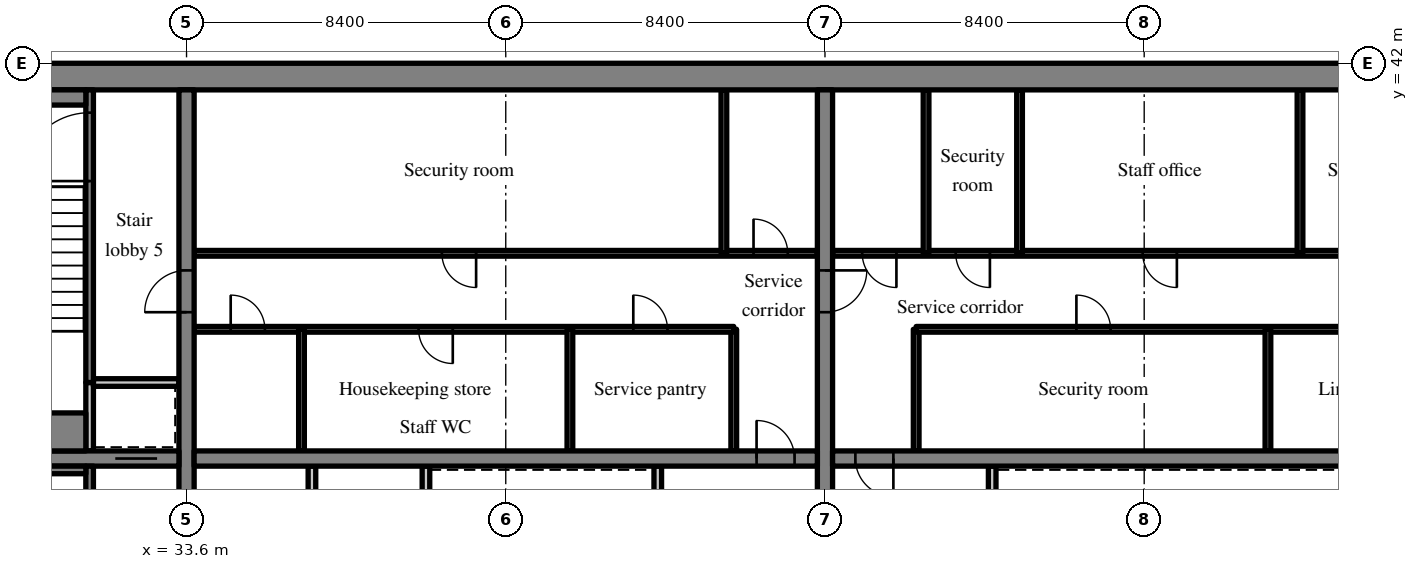
"""IFC4 building model, lengths in metres.
Left out: names, types, materials, properties, quantities, classifications, styles, units other than length and angle.
Written with IfcOpenShell. Run it as: python <this file> out.ifc"""

import sys

from ifc_helpers import new_model, si_unit, direction, frame, frame_2d, origin, place, context, subcontext, project, spatial, rectangle, extrude, source, transform, mapped, element, fill, save


model = new_model("IFC4")
c1 = context("Model", 3, precision=1e-05, world=origin(), true_north=direction((0.0, 1.0)))
c2 = subcontext(c1, "Body", "Model", "MODEL_VIEW")
j1 = project(units=[si_unit("LENGTHUNIT", "METRE"), si_unit("PLANEANGLEUNIT", "RADIAN")], contexts=[c1])
p1 = place(None, origin())
s1 = spatial("IfcSite", under=j1, at=p1, CompositionType="ELEMENT")
p2 = place(p1, origin())
s2 = spatial("IfcBuilding", under=s1, at=p2, CompositionType="ELEMENT")
p3 = place(p2, frame((0.0, 0.0, 189.6)))
s3 = spatial("IfcBuildingStorey", under=s2, at=p3, CompositionType="ELEMENT", Elevation=189.6)
m1 = source(origin(), c2, "Body", "SweptSolid", [
    extrude(rectangle(XDim=50.4, YDim=0.7, at=frame_2d((25.2, 0.0))), origin(), (0.0, 0.0, 1.0), 3.52),
])
p4 = place(p3, frame((25.2, 41.65, 0.0), z_axis=(0.0, 0.0, 1.0), x_axis=(1.0, 0.0, 0.0)))
e1 = element("IfcWall", 1, at=p4, inside=s3, PredefinedType="SHEAR", context=c2, shape_type="MappedRepresentation", body=[
    mapped(m1, transform((0.0, 0.0, 0.0), scale=1.0)),
])
m2 = source(origin(), c2, "Body", "SweptSolid", [
    extrude(rectangle(XDim=18.6, YDim=0.4, at=frame_2d((9.3, 0.0))), origin(), (0.0, 0.0, 1.0), 3.52),
])
p5 = place(p3, frame((33.6, 22.7, 0.0), z_axis=(0.0, 0.0, 1.0), x_axis=(0.0, 1.0, 0.0)))
e2 = element("IfcWall", 2, at=p5, inside=s3, PredefinedType="SHEAR", context=c2, shape_type="MappedRepresentation", body=[
    mapped(m2, transform((0.0, 0.0, 0.0), scale=1.0)),
])
m3 = source(origin(), c2, "Body", "SweptSolid", [
    extrude(rectangle(XDim=1.1, YDim=2.1, at=frame_2d((0.55, 1.05))), frame((0.0, 0.21, 0.0), z_axis=(0.0, -1.0, 0.0), x_axis=(1.0, 0.0, 0.0)), (0.0, 0.0, 1.0), 0.42),
])
p6 = place(p5, frame((12.75, 0.0, 0.0)))
e3 = element("IfcOpeningElement", 3, at=p6, cuts=e2, PredefinedType="OPENING", context=c2, shape_type="MappedRepresentation", body=[
    mapped(m3, transform((0.0, 0.0, 0.0), scale=1.0)),
])
p7 = place(p3, frame((50.4, 22.7, 0.0), z_axis=(0.0, 0.0, 1.0), x_axis=(0.0, 1.0, 0.0)))
e4 = element("IfcWall", 4, at=p7, inside=s3, PredefinedType="SHEAR", context=c2, shape_type="MappedRepresentation", body=[
    mapped(m2, transform((0.0, 0.0, 0.0), scale=1.0)),
])
p8 = place(p7, frame((12.75, 0.0, 0.0)))
e5 = element("IfcOpeningElement", 5, at=p8, cuts=e4, PredefinedType="OPENING", context=c2, shape_type="MappedRepresentation", body=[
    mapped(m3, transform((0.0, 0.0, 0.0), scale=1.0)),
])
m4 = source(origin(), c2, "Body", "SweptSolid", [
    extrude(rectangle(XDim=7.5, YDim=0.4, at=frame_2d((3.75, 0.0))), origin(), (0.0, 0.0, 1.0), 3.52),
])
p9 = place(p3, frame((25.9, 31.6, 0.0), z_axis=(0.0, 0.0, 1.0), x_axis=(1.0, 0.0, 0.0)))
e6 = element("IfcWall", 6, at=p9, inside=s3, PredefinedType="SHEAR", context=c2, shape_type="MappedRepresentation", body=[
    mapped(m4, transform((0.0, 0.0, 0.0), scale=1.0)),
])
p10 = place(p9, frame((5.825, 0.0, 0.0)))
e7 = element("IfcOpeningElement", 7, at=p10, cuts=e6, PredefinedType="OPENING", context=c2, shape_type="MappedRepresentation", body=[
    mapped(m3, transform((0.0, 0.0, 0.0), scale=1.0)),
])
m5 = source(origin(), c2, "Body", "SweptSolid", [
    extrude(rectangle(XDim=16.4, YDim=0.4, at=frame_2d((8.2, 0.0))), origin(), (0.0, 0.0, 1.0), 3.52),
])
p11 = place(p3, frame((33.8, 31.6, 0.0), z_axis=(0.0, 0.0, 1.0), x_axis=(1.0, 0.0, 0.0)))
e8 = element("IfcWall", 8, at=p11, inside=s3, PredefinedType="SHEAR", context=c2, shape_type="MappedRepresentation", body=[
    mapped(m5, transform((0.0, 0.0, 0.0), scale=1.0)),
])
m6 = source(origin(), c2, "Body", "SweptSolid", [
    extrude(rectangle(XDim=1.0, YDim=2.1, at=frame_2d((0.5, 1.05))), frame((0.0, 0.21, 0.0), z_axis=(0.0, -1.0, 0.0), x_axis=(1.0, 0.0, 0.0)), (0.0, 0.0, 1.0), 0.42),
])
p12 = place(p11, frame((14.8, 0.0, 0.0)))
e9 = element("IfcOpeningElement", 9, at=p12, cuts=e8, PredefinedType="OPENING", context=c2, shape_type="MappedRepresentation", body=[
    mapped(m6, transform((0.0, 0.0, 0.0), scale=1.0)),
])
p13 = place(p3, frame((50.6, 31.6, 0.0), z_axis=(0.0, 0.0, 1.0), x_axis=(1.0, 0.0, 0.0)))
e10 = element("IfcWall", 10, at=p13, inside=s3, PredefinedType="SHEAR", context=c2, shape_type="MappedRepresentation", body=[
    mapped(m5, transform((0.0, 0.0, 0.0), scale=1.0)),
])
p14 = place(p13, frame((0.6, 0.0, 0.0)))
e11 = element("IfcOpeningElement", 11, at=p14, cuts=e10, PredefinedType="OPENING", context=c2, shape_type="MappedRepresentation", body=[
    mapped(m6, transform((0.0, 0.0, 0.0), scale=1.0)),
])
m7 = source(origin(), c2, "Body", "SweptSolid", [
    extrude(rectangle(XDim=8.7, YDim=0.2, at=frame_2d((4.35, 0.0))), origin(), (0.0, 0.0, 1.0), 3.52),
])
p15 = place(p3, frame((39.9, 22.7, 0.0), z_axis=(0.0, 0.0, 1.0), x_axis=(0.0, 1.0, 0.0)))
e12 = element("IfcWall", 12, at=p15, inside=s3, PredefinedType="PARTITIONING", context=c2, shape_type="MappedRepresentation", body=[
    mapped(m7, transform((0.0, 0.0, 0.0), scale=1.0)),
])
m8 = source(origin(), c2, "Body", "SweptSolid", [
    extrude(rectangle(XDim=0.9, YDim=2.1, at=frame_2d((0.45, 1.05))), frame((0.0, 0.11, 0.0), z_axis=(0.0, -1.0, 0.0), x_axis=(1.0, 0.0, 0.0)), (0.0, 0.0, 1.0), 0.22),
])
p16 = place(p15, frame((3.05, 0.0, 0.0)))
e13 = element("IfcOpeningElement", 13, at=p16, cuts=e12, PredefinedType="OPENING", context=c2, shape_type="MappedRepresentation", body=[
    mapped(m8, transform((0.0, 0.0, 0.0), scale=1.0)),
])
p17 = place(p15, frame((4.85, 0.0, 0.0)))
e14 = element("IfcOpeningElement", 14, at=p17, cuts=e12, PredefinedType="OPENING", context=c2, shape_type="MappedRepresentation", body=[
    mapped(m8, transform((0.0, 0.0, 0.0), scale=1.0)),
])
m9 = source(origin(), c2, "Body", "SweptSolid", [
    extrude(rectangle(XDim=2.6, YDim=0.2, at=frame_2d((1.3, 0.0))), origin(), (0.0, 0.0, 1.0), 3.52),
])
p18 = place(p3, frame((46.0, 28.8, 0.0), z_axis=(0.0, 0.0, 1.0), x_axis=(0.0, 1.0, 0.0)))
e15 = element("IfcWall", 15, at=p18, inside=s3, PredefinedType="SOLIDWALL", context=c2, shape_type="MappedRepresentation", body=[
    mapped(m9, transform((0.0, 0.0, 0.0), scale=1.0)),
])
p19 = place(p3, frame((36.9, 22.7, 0.0), z_axis=(0.0, 0.0, 1.0), x_axis=(0.0, 1.0, 0.0)))
e16 = element("IfcWall", 16, at=p19, inside=s3, PredefinedType="PARTITIONING", context=c2, shape_type="MappedRepresentation", body=[
    mapped(m7, transform((0.0, 0.0, 0.0), scale=1.0)),
])
m10 = source(origin(), c2, "Body", "SweptSolid", [
    extrude(rectangle(XDim=3.2, YDim=0.15, at=frame_2d((1.6, 0.0))), origin(), (0.0, 0.0, 1.0), 3.52),
])
p20 = place(p3, frame((48.0, 31.8, 0.0), z_axis=(0.0, 0.0, 1.0), x_axis=(0.0, 1.0, 0.0)))
e17 = element("IfcWall", 17, at=p20, inside=s3, PredefinedType="PARTITIONING", context=c2, shape_type="MappedRepresentation", body=[
    mapped(m10, transform((0.0, 0.0, 0.0), scale=1.0)),
])
m11 = source(origin(), c2, "Body", "SweptSolid", [
    extrude(rectangle(XDim=14.2, YDim=0.15, at=frame_2d((7.1, 0.0))), origin(), (0.0, 0.0, 1.0), 3.52),
])
p21 = place(p3, frame((33.8, 35.0, 0.0), z_axis=(0.0, 0.0, 1.0), x_axis=(1.0, 0.0, 0.0)))
e18 = element("IfcWall", 18, at=p21, inside=s3, PredefinedType="PARTITIONING", context=c2, shape_type="MappedRepresentation", body=[
    mapped(m11, transform((0.0, 0.0, 0.0), scale=1.0)),
])
m12 = source(origin(), c2, "Body", "SweptSolid", [
    extrude(rectangle(XDim=0.9, YDim=2.1, at=frame_2d((0.45, 1.05))), frame((0.0, 0.085, 0.0), z_axis=(0.0, -1.0, 0.0), x_axis=(1.0, 0.0, 0.0)), (0.0, 0.0, 1.0), 0.17),
])
p22 = place(p21, frame((0.962, 0.0, 0.0)))
e19 = element("IfcOpeningElement", 19, at=p22, cuts=e18, PredefinedType="OPENING", context=c2, shape_type="MappedRepresentation", body=[
    mapped(m12, transform((0.0, 0.0, 0.0), scale=1.0)),
])
p23 = place(p21, frame((5.906, 0.0, 0.0)))
e20 = element("IfcOpeningElement", 20, at=p23, cuts=e18, PredefinedType="OPENING", context=c2, shape_type="MappedRepresentation", body=[
    mapped(m12, transform((0.0, 0.0, 0.0), scale=1.0)),
])
p24 = place(p21, frame((11.556, 0.0, 0.0)))
e21 = element("IfcOpeningElement", 21, at=p24, cuts=e18, PredefinedType="OPENING", context=c2, shape_type="MappedRepresentation", body=[
    mapped(m12, transform((0.0, 0.0, 0.0), scale=1.0)),
])
m13 = source(origin(), c2, "Body", "SweptSolid", [
    extrude(rectangle(XDim=16.4, YDim=0.15, at=frame_2d((8.2, 0.0))), origin(), (0.0, 0.0, 1.0), 3.52),
])
p25 = place(p3, frame((33.8, 37.0, 0.0), z_axis=(0.0, 0.0, 1.0), x_axis=(1.0, 0.0, 0.0)))
e22 = element("IfcWall", 22, at=p25, inside=s3, PredefinedType="PARTITIONING", context=c2, shape_type="MappedRepresentation", body=[
    mapped(m13, transform((0.0, 0.0, 0.0), scale=1.0)),
])
p26 = place(p25, frame((6.52, 0.0, 0.0)))
e23 = element("IfcOpeningElement", 23, at=p26, cuts=e22, PredefinedType="OPENING", context=c2, shape_type="MappedRepresentation", body=[
    mapped(m12, transform((0.0, 0.0, 0.0), scale=1.0)),
])
p27 = place(p25, frame((14.72, 0.0, 0.0)))
e24 = element("IfcOpeningElement", 24, at=p27, cuts=e22, PredefinedType="OPENING", context=c2, shape_type="MappedRepresentation", body=[
    mapped(m12, transform((0.0, 0.0, 0.0), scale=1.0)),
])
for number, where, z_axis, x_axis in (
    (25, (36.625, 31.8, 0.0), (0.0, 0.0, 1.0), (0.0, 1.0, 0.0)),
    (26, (43.688, 31.8, 0.0), (0.0, 0.0, 1.0), (0.0, 1.0, 0.0)),
):
    element("IfcWall", number, at=place(p3, frame(where, z_axis=z_axis, x_axis=x_axis)), inside=s3, PredefinedType="PARTITIONING", context=c2, shape_type="MappedRepresentation", body=[
        mapped(m10, transform((0.0, 0.0, 0.0), scale=1.0)),
    ])
m14 = source(origin(), c2, "Body", "SweptSolid", [
    extrude(rectangle(XDim=4.3, YDim=0.15, at=frame_2d((2.15, 0.0))), origin(), (0.0, 0.0, 1.0), 3.52),
])
p28 = place(p3, frame((47.74, 37.0, 0.0), z_axis=(0.0, 0.0, 1.0), x_axis=(0.0, 1.0, 0.0)))
e27 = element("IfcWall", 27, at=p28, inside=s3, PredefinedType="PARTITIONING", context=c2, shape_type="MappedRepresentation", body=[
    mapped(m14, transform((0.0, 0.0, 0.0), scale=1.0)),
])
p29 = place(p3, frame((54.8, 28.8, 0.0), z_axis=(0.0, 0.0, 1.0), x_axis=(0.0, 1.0, 0.0)))
e28 = element("IfcWall", 28, at=p29, inside=s3, PredefinedType="SOLIDWALL", context=c2, shape_type="MappedRepresentation", body=[
    mapped(m9, transform((0.0, 0.0, 0.0), scale=1.0)),
])
p30 = place(p3, frame((52.8, 31.8, 0.0), z_axis=(0.0, 0.0, 1.0), x_axis=(0.0, 1.0, 0.0)))
e29 = element("IfcWall", 29, at=p30, inside=s3, PredefinedType="PARTITIONING", context=c2, shape_type="MappedRepresentation", body=[
    mapped(m10, transform((0.0, 0.0, 0.0), scale=1.0)),
])
p31 = place(p3, frame((67.0, 35.0, 0.0), z_axis=(0.0, 0.0, 1.0), x_axis=(-1.0, 0.0, 0.0)))
e30 = element("IfcWall", 30, at=p31, inside=s3, PredefinedType="PARTITIONING", context=c2, shape_type="MappedRepresentation", body=[
    mapped(m11, transform((0.0, 0.0, 0.0), scale=1.0)),
])
p32 = place(p31, frame((2.022, 0.0, 0.0)))
e31 = element("IfcOpeningElement", 31, at=p32, cuts=e30, PredefinedType="OPENING", context=c2, shape_type="MappedRepresentation", body=[
    mapped(m12, transform((0.0, 0.0, 0.0), scale=1.0)),
])
p33 = place(p31, frame((9.084, 0.0, 0.0)))
e32 = element("IfcOpeningElement", 32, at=p33, cuts=e30, PredefinedType="OPENING", context=c2, shape_type="MappedRepresentation", body=[
    mapped(m12, transform((0.0, 0.0, 0.0), scale=1.0)),
])
p34 = place(p3, frame((67.0, 37.0, 0.0), z_axis=(0.0, 0.0, 1.0), x_axis=(-1.0, 0.0, 0.0)))
e33 = element("IfcWall", 33, at=p34, inside=s3, PredefinedType="PARTITIONING", context=c2, shape_type="MappedRepresentation", body=[
    mapped(m13, transform((0.0, 0.0, 0.0), scale=1.0)),
])
p35 = place(p34, frame((1.6, 0.0, 0.0)))
e34 = element("IfcOpeningElement", 34, at=p35, cuts=e33, PredefinedType="OPENING", context=c2, shape_type="MappedRepresentation", body=[
    mapped(m12, transform((0.0, 0.0, 0.0), scale=1.0)),
])
p36 = place(p34, frame((7.34, 0.0, 0.0)))
e35 = element("IfcOpeningElement", 35, at=p36, cuts=e33, PredefinedType="OPENING", context=c2, shape_type="MappedRepresentation", body=[
    mapped(m12, transform((0.0, 0.0, 0.0), scale=1.0)),
])
p37 = place(p34, frame((12.26, 0.0, 0.0)))
e36 = element("IfcOpeningElement", 36, at=p37, cuts=e33, PredefinedType="OPENING", context=c2, shape_type="MappedRepresentation", body=[
    mapped(m12, transform((0.0, 0.0, 0.0), scale=1.0)),
])
p38 = place(p34, frame((14.72, 0.0, 0.0)))
e37 = element("IfcOpeningElement", 37, at=p38, cuts=e33, PredefinedType="OPENING", context=c2, shape_type="MappedRepresentation", body=[
    mapped(m12, transform((0.0, 0.0, 0.0), scale=1.0)),
])
p39 = place(p3, frame((62.056, 31.8, 0.0), z_axis=(0.0, 0.0, 1.0), x_axis=(0.0, 1.0, 0.0)))
e38 = element("IfcWall", 38, at=p39, inside=s3, PredefinedType="PARTITIONING", context=c2, shape_type="MappedRepresentation", body=[
    mapped(m10, transform((0.0, 0.0, 0.0), scale=1.0)),
])
for number, where, z_axis, x_axis in (
    (39, (62.9, 37.0, 0.0), (0.0, 0.0, 1.0), (0.0, 1.0, 0.0)),
    (40, (55.52, 37.0, 0.0), (0.0, 0.0, 1.0), (0.0, 1.0, 0.0)),
    (41, (53.06, 37.0, 0.0), (0.0, 0.0, 1.0), (0.0, 1.0, 0.0)),
):
    element("IfcWall", number, at=place(p3, frame(where, z_axis=z_axis, x_axis=x_axis)), inside=s3, PredefinedType="PARTITIONING", context=c2, shape_type="MappedRepresentation", body=[
        mapped(m14, transform((0.0, 0.0, 0.0), scale=1.0)),
    ])
m15 = source(origin(), c2, "Body", "SweptSolid", [
    extrude(rectangle(XDim=8.7, YDim=0.2, at=frame_2d((4.35, 0.0))), origin(), (0.0, 0.0, 1.0), 3.52),
])
p40 = place(p3, frame((31.05, 22.7, 0.0), z_axis=(0.0, 0.0, 1.0), x_axis=(0.0, 1.0, 0.0)))
e42 = element("IfcWall", 42, at=p40, inside=s3, PredefinedType="SOLIDWALL", context=c2, shape_type="MappedRepresentation", body=[
    mapped(m15, transform((0.0, 0.0, 0.0), scale=1.0)),
])
m16 = source(origin(), c2, "Body", "SweptSolid", [
    extrude(rectangle(XDim=1.2, YDim=2.1, at=frame_2d((0.6, 1.05))), frame((0.0, 0.11, 0.0), z_axis=(0.0, -1.0, 0.0), x_axis=(1.0, 0.0, 0.0)), (0.0, 0.0, 1.0), 0.22),
])
p41 = place(p40, frame((6.8, 0.0, 0.0)))
e43 = element("IfcOpeningElement", 43, at=p41, cuts=e42, PredefinedType="OPENING", context=c2, shape_type="MappedRepresentation", body=[
    mapped(m16, transform((0.0, 0.0, 0.0), scale=1.0)),
])
m17 = source(origin(), c2, "Body", "SweptSolid", [
    extrude(rectangle(XDim=1.8, YDim=0.2, at=frame_2d((0.9, 0.0))), origin(), (0.0, 0.0, 1.0), 3.52),
])
p42 = place(p3, frame((31.05, 31.8, 0.0), z_axis=(0.0, 0.0, 1.0), x_axis=(0.0, 1.0, 0.0)))
e44 = element("IfcWall", 44, at=p42, inside=s3, PredefinedType="SOLIDWALL", context=c2, shape_type="MappedRepresentation", body=[
    mapped(m17, transform((0.0, 0.0, 0.0), scale=1.0)),
])
m18 = source(origin(), c2, "Body", "SweptSolid", [
    extrude(rectangle(XDim=2.25, YDim=0.2, at=frame_2d((1.125, 0.0))), origin(), (0.0, 0.0, 1.0), 3.52),
])
p43 = place(p3, frame((31.15, 33.6, 0.0), z_axis=(0.0, 0.0, 1.0), x_axis=(1.0, 0.0, 0.0)))
e45 = element("IfcWall", 45, at=p43, inside=s3, PredefinedType="SOLIDWALL", context=c2, shape_type="MappedRepresentation", body=[
    mapped(m18, transform((0.0, 0.0, 0.0), scale=1.0)),
])
m19 = source(origin(), c2, "Body", "SweptSolid", [
    extrude(rectangle(XDim=7.7, YDim=0.2, at=frame_2d((3.85, 0.0))), origin(), (0.0, 0.0, 1.0), 3.52),
])
p44 = place(p3, frame((31.05, 33.6, 0.0), z_axis=(0.0, 0.0, 1.0), x_axis=(0.0, 1.0, 0.0)))
e46 = element("IfcWall", 46, at=p44, inside=s3, PredefinedType="SOLIDWALL", context=c2, shape_type="MappedRepresentation", body=[
    mapped(m19, transform((0.0, 0.0, 0.0), scale=1.0)),
])
m20 = source(origin(), c2, "Body", "SweptSolid", [
    extrude(rectangle(XDim=1.8, YDim=2.1, at=frame_2d((0.9, 1.05))), frame((0.0, 0.11, 0.0), z_axis=(0.0, -1.0, 0.0), x_axis=(1.0, 0.0, 0.0)), (0.0, 0.0, 1.0), 0.22),
])
p45 = place(p44, frame((5.3, 0.0, 0.0)))
e47 = element("IfcOpeningElement", 47, at=p45, cuts=e46, PredefinedType="OPENING", context=c2, shape_type="MappedRepresentation", body=[
    mapped(m20, transform((0.0, 0.0, 0.0), scale=1.0)),
])
m21 = source(origin(), c2, "Body", "SweptSolid", [
    extrude(rectangle(XDim=5.05, YDim=0.2, at=frame_2d((2.525, 0.0))), origin(), (0.0, 0.0, 1.0), 3.52),
])
p46 = place(p3, frame((25.9, 31.3, 0.0), z_axis=(0.0, 0.0, 1.0), x_axis=(1.0, 0.0, 0.0)))
e48 = element("IfcWall", 48, at=p46, inside=s3, PredefinedType="SOLIDWALL", context=c2, shape_type="MappedRepresentation", body=[
    mapped(m21, transform((0.0, 0.0, 0.0), scale=1.0)),
])
m22 = source(origin(), c2, "Body", "SweptSolid", [
    extrude(rectangle(XDim=5.05, YDim=0.4, at=frame_2d((2.525, 0.0))), origin(), (0.0, 0.0, 1.0), 3.52),
])
p47 = place(p3, frame((25.9, 41.1, 0.0), z_axis=(0.0, 0.0, 1.0), x_axis=(1.0, 0.0, 0.0)))
e49 = element("IfcWall", 49, at=p47, inside=s3, PredefinedType="SOLIDWALL", context=c2, shape_type="MappedRepresentation", body=[
    mapped(m22, transform((0.0, 0.0, 0.0), scale=1.0)),
])
m23 = source(origin(), c2, "Body", "SweptSolid", [
    extrude(rectangle(XDim=5.05, YDim=1.0, at=frame_2d((2.525, 0.0))), origin(), (0.0, 0.0, 1.0), 3.52),
])
p48 = place(p3, frame((25.9, 32.3, 0.0), z_axis=(0.0, 0.0, 1.0), x_axis=(1.0, 0.0, 0.0)))
e50 = element("IfcWall", 50, at=p48, inside=s3, PredefinedType="SOLIDWALL", context=c2, shape_type="MappedRepresentation", body=[
    mapped(m23, transform((0.0, 0.0, 0.0), scale=1.0)),
])
m24 = source(origin(), c2, "Body", "SweptSolid", [
    extrude(rectangle(XDim=1.0, YDim=2.1, at=frame_2d((0.5, 1.05))), frame((0.0, 0.025, 0.0), z_axis=(0.0, -1.0, 0.0), x_axis=(1.0, 0.0, 0.0)), (0.0, 0.0, 1.0), 0.05),
])
p49 = place(p12, origin())
e51 = element("IfcDoor", 51, at=p49, inside=s3, OperationType="SINGLE_SWING_LEFT", PredefinedType="DOOR", context=c2, shape_type="MappedRepresentation", body=[
    mapped(m24, transform((0.0, 0.0, 0.0), scale=1.0)),
])
fill(e9, e51)
m25 = source(origin(), c2, "Body", "SweptSolid", [
    extrude(rectangle(XDim=0.9, YDim=2.1, at=frame_2d((0.45, 1.05))), frame((0.0, 0.025, 0.0), z_axis=(0.0, -1.0, 0.0), x_axis=(1.0, 0.0, 0.0)), (0.0, 0.0, 1.0), 0.05),
])
p50 = place(p22, origin())
e52 = element("IfcDoor", 52, at=p50, inside=s3, OperationType="SINGLE_SWING_LEFT", PredefinedType="DOOR", context=c2, shape_type="MappedRepresentation", body=[
    mapped(m25, transform((0.0, 0.0, 0.0), scale=1.0)),
])
fill(e19, e52)
p51 = place(p23, origin())
e53 = element("IfcDoor", 53, at=p51, inside=s3, OperationType="SINGLE_SWING_RIGHT", PredefinedType="DOOR", context=c2, shape_type="MappedRepresentation", body=[
    mapped(m25, transform((0.0, 0.0, 0.0), scale=1.0)),
])
fill(e20, e53)
p52 = place(p24, origin())
e54 = element("IfcDoor", 54, at=p52, inside=s3, OperationType="SINGLE_SWING_LEFT", PredefinedType="DOOR", context=c2, shape_type="MappedRepresentation", body=[
    mapped(m25, transform((0.0, 0.0, 0.0), scale=1.0)),
])
fill(e21, e54)
p53 = place(p26, origin())
e55 = element("IfcDoor", 55, at=p53, inside=s3, OperationType="SINGLE_SWING_RIGHT", PredefinedType="DOOR", context=c2, shape_type="MappedRepresentation", body=[
    mapped(m25, transform((0.0, 0.0, 0.0), scale=1.0)),
])
fill(e23, e55)
p54 = place(p27, origin())
e56 = element("IfcDoor", 56, at=p54, inside=s3, OperationType="SINGLE_SWING_LEFT", PredefinedType="DOOR", context=c2, shape_type="MappedRepresentation", body=[
    mapped(m25, transform((0.0, 0.0, 0.0), scale=1.0)),
])
fill(e24, e56)
p55 = place(p14, origin())
e57 = element("IfcDoor", 57, at=p55, inside=s3, OperationType="SINGLE_SWING_RIGHT", PredefinedType="DOOR", context=c2, shape_type="MappedRepresentation", body=[
    mapped(m24, transform((0.0, 0.0, 0.0), scale=1.0)),
])
fill(e11, e57)
p56 = place(p33, origin())
e58 = element("IfcDoor", 58, at=p56, inside=s3, OperationType="SINGLE_SWING_RIGHT", PredefinedType="DOOR", context=c2, shape_type="MappedRepresentation", body=[
    mapped(m25, transform((0.0, 0.0, 0.0), scale=1.0)),
])
fill(e32, e58)
p57 = place(p36, origin())
e59 = element("IfcDoor", 59, at=p57, inside=s3, OperationType="SINGLE_SWING_LEFT", PredefinedType="DOOR", context=c2, shape_type="MappedRepresentation", body=[
    mapped(m25, transform((0.0, 0.0, 0.0), scale=1.0)),
])
fill(e35, e59)
p58 = place(p37, origin())
e60 = element("IfcDoor", 60, at=p58, inside=s3, OperationType="SINGLE_SWING_LEFT", PredefinedType="DOOR", context=c2, shape_type="MappedRepresentation", body=[
    mapped(m25, transform((0.0, 0.0, 0.0), scale=1.0)),
])
fill(e36, e60)
p59 = place(p38, origin())
e61 = element("IfcDoor", 61, at=p59, inside=s3, OperationType="SINGLE_SWING_LEFT", PredefinedType="DOOR", context=c2, shape_type="MappedRepresentation", body=[
    mapped(m25, transform((0.0, 0.0, 0.0), scale=1.0)),
])
fill(e37, e61)
m26 = source(origin(), c2, "Body", "SweptSolid", [
    extrude(rectangle(XDim=1.1, YDim=2.1, at=frame_2d((0.55, 1.05))), frame((0.0, 0.025, 0.0), z_axis=(0.0, -1.0, 0.0), x_axis=(1.0, 0.0, 0.0)), (0.0, 0.0, 1.0), 0.05),
])
p60 = place(p10, origin())
e62 = element("IfcDoor", 62, at=p60, inside=s3, OperationType="SLIDING_TO_RIGHT", PredefinedType="DOOR", context=c2, shape_type="MappedRepresentation", body=[
    mapped(m26, transform((0.0, 0.0, 0.0), scale=1.0)),
])
fill(e7, e62)
m27 = source(origin(), c2, "Body", "SweptSolid", [
    extrude(rectangle(XDim=1.8, YDim=2.1, at=frame_2d((0.9, 1.05))), frame((0.0, 0.025, 0.0), z_axis=(0.0, -1.0, 0.0), x_axis=(1.0, 0.0, 0.0)), (0.0, 0.0, 1.0), 0.05),
])
p61 = place(p45, origin())
e63 = element("IfcDoor", 63, at=p61, inside=s3, OperationType="SINGLE_SWING_LEFT", PredefinedType="DOOR", context=c2, shape_type="MappedRepresentation", body=[
    mapped(m27, transform((0.0, 0.0, 0.0), scale=1.0)),
])
fill(e47, e63)
p62 = place(p6, origin())
e64 = element("IfcDoor", 64, at=p62, inside=s3, OperationType="SINGLE_SWING_LEFT", PredefinedType="DOOR", context=c2, shape_type="MappedRepresentation", body=[
    mapped(m26, transform((0.0, 0.0, 0.0), scale=1.0)),
])
fill(e3, e64)
p63 = place(p8, origin())
e65 = element("IfcDoor", 65, at=p63, inside=s3, OperationType="SINGLE_SWING_RIGHT", PredefinedType="DOOR", context=c2, shape_type="MappedRepresentation", body=[
    mapped(m26, transform((0.0, 0.0, 0.0), scale=1.0)),
])
fill(e5, e65)
save(model, sys.argv[1])
